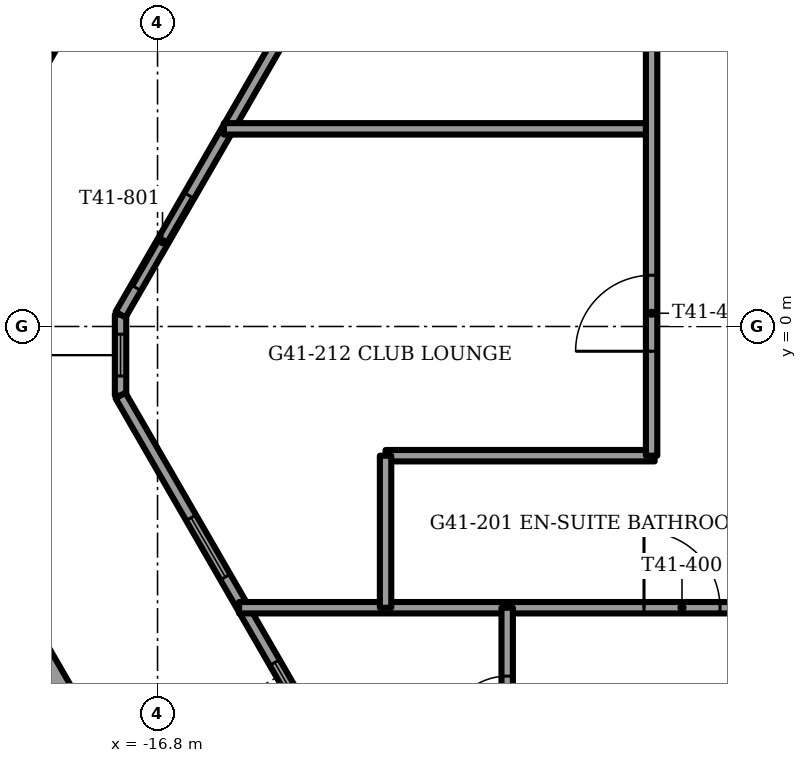
"""IFC4 building model, lengths in metres.
Left out: names, types, materials, properties, quantities, classifications, styles, units other than length and angle.
Written with IfcOpenShell. Run it as: python <this file> out.ifc"""

import sys

from ifc_helpers import new_model, si_unit, direction, frame, frame_2d, origin, place, context, subcontext, project, spatial, rectangle, extrude, element, fill, save


model = new_model("IFC4")
c1 = context("Model", 3, precision=1e-05, world=origin(), true_north=direction((0.0, 1.0)))
c2 = subcontext(c1, "Body", "Model", "MODEL_VIEW")
j1 = project(units=[si_unit("LENGTHUNIT", "METRE"), si_unit("PLANEANGLEUNIT", "RADIAN")], contexts=[c1])
p1 = place(None, origin())
s1 = spatial("IfcSite", under=j1, at=p1, CompositionType="ELEMENT")
p2 = place(p1, origin())
s2 = spatial("IfcBuilding", under=s1, at=p2, CompositionType="ELEMENT")
p3 = place(p2, frame((0.0, 0.0, 168.25)))
s3 = spatial("IfcBuildingStorey", under=s2, at=p3, CompositionType="ELEMENT", Elevation=168.25)
p4 = place(p3, frame((-17.61, 5.446, 0.0), z_axis=(0.0, 0.0, 1.0), x_axis=(-0.500000533151, -0.866025095969, 0.0)))
e1 = element("IfcWall", 1, at=p4, inside=s3, PredefinedType="PARAPET", context=c2, shape_type="SweptSolid", body=[
    extrude(rectangle(XDim=6.181, YDim=0.9, at=frame_2d((3.091, 0.0))), origin(), (0.0, 0.0, 1.0), 1.1),
])
p5 = place(p3, frame((-20.7, -0.846, 0.0), z_axis=(0.0, 0.0, 1.0), x_axis=(0.500014212531, -0.86601719802, 0.0)))
e2 = element("IfcWall", 2, at=p5, inside=s3, PredefinedType="PARAPET", context=c2, shape_type="SweptSolid", body=[
    extrude(rectangle(XDim=5.529, YDim=0.9, at=frame_2d((2.765, 0.0))), origin(), (0.0, 0.0, 1.0), 1.1),
])
p6 = place(p3, frame((-7.393, 17.292, 0.0), z_axis=(0.0, 0.0, 1.0), x_axis=(-0.500001917853, -0.866024296509, 0.0)))
e3 = element("IfcWall", 3, at=p6, inside=s3, PredefinedType="SOLIDWALL", context=c2, shape_type="SweptSolid", body=[
    extrude(rectangle(XDim=19.788, YDim=0.15, at=frame_2d((9.894, 0.0))), origin(), (0.0, 0.0, 1.0), 3.45),
])
p7 = place(p6, frame((3.868, 0.0, 0.15)))
e4 = element("IfcOpeningElement", 4, at=p7, cuts=e3, PredefinedType="OPENING", context=c2, shape_type="SweptSolid", body=[
    extrude(rectangle(XDim=1.4, YDim=2.85, at=frame_2d((0.7, 1.425))), frame((0.0, 0.075, 0.0), z_axis=(0.0, -1.0, 0.0), x_axis=(1.0, 0.0, 0.0)), (0.0, 0.0, 1.0), 0.15),
])
p8 = place(p6, frame((10.067, 0.0, 0.15)))
e5 = element("IfcOpeningElement", 5, at=p8, cuts=e3, PredefinedType="OPENING", context=c2, shape_type="SweptSolid", body=[
    extrude(rectangle(XDim=0.9, YDim=2.85, at=frame_2d((0.45, 1.425))), frame((0.0, 0.075, 0.0), z_axis=(0.0, -1.0, 0.0), x_axis=(1.0, 0.0, 0.0)), (0.0, 0.0, 1.0), 0.15),
])
p9 = place(p6, frame((7.967, 0.0, 0.15)))
e6 = element("IfcOpeningElement", 6, at=p9, cuts=e3, PredefinedType="OPENING", context=c2, shape_type="SweptSolid", body=[
    extrude(rectangle(XDim=1.4, YDim=2.85, at=frame_2d((0.7, 1.425))), frame((0.0, 0.075, 0.0), z_axis=(0.0, -1.0, 0.0), x_axis=(1.0, 0.0, 0.0)), (0.0, 0.0, 1.0), 0.15),
])
p10 = place(p6, frame((13.779, 0.0, 0.0)))
e7 = element("IfcOpeningElement", 7, at=p10, cuts=e3, PredefinedType="OPENING", context=c2, shape_type="SweptSolid", body=[
    extrude(rectangle(XDim=1.4, YDim=2.4, at=frame_2d((0.7, 1.2))), frame((0.0, 0.075, 0.0), z_axis=(0.0, -1.0, 0.0), x_axis=(1.0, 0.0, 0.0)), (0.0, 0.0, 1.0), 0.15),
])
p11 = place(p6, frame((17.979, 0.0, 0.0)))
e8 = element("IfcOpeningElement", 8, at=p11, cuts=e3, PredefinedType="OPENING", context=c2, shape_type="SweptSolid", body=[
    extrude(rectangle(XDim=1.4, YDim=2.4, at=frame_2d((0.7, 1.2))), frame((0.0, 0.075, 0.0), z_axis=(0.0, -1.0, 0.0), x_axis=(1.0, 0.0, 0.0)), (0.0, 0.0, 1.0), 0.15),
])
p12 = place(p6, frame((0.168, 0.0, 0.15)))
e9 = element("IfcOpeningElement", 9, at=p12, cuts=e3, PredefinedType="OPENING", context=c2, shape_type="SweptSolid", body=[
    extrude(rectangle(XDim=1.6, YDim=2.73, at=frame_2d((0.8, 1.365))), frame((0.0, 0.075, 0.0), z_axis=(0.0, -1.0, 0.0), x_axis=(1.0, 0.0, 0.0)), (0.0, 0.0, 1.0), 0.15),
])
p13 = place(p3, frame((-17.287, -0.909, 0.0), z_axis=(0.0, 0.0, 1.0), x_axis=(0.500004460396, -0.866022828558, 0.0)))
e10 = element("IfcWall", 10, at=p13, inside=s3, PredefinedType="SOLIDWALL", context=c2, shape_type="SweptSolid", body=[
    extrude(rectangle(XDim=15.712, YDim=0.15, at=frame_2d((7.856, 0.0))), origin(), (0.0, 0.0, 1.0), 3.45),
])
p14 = place(p13, frame((1.856, 0.0, 0.15)))
e11 = element("IfcOpeningElement", 11, at=p14, cuts=e10, PredefinedType="OPENING", context=c2, shape_type="SweptSolid", body=[
    extrude(rectangle(XDim=0.9, YDim=2.85, at=frame_2d((0.45, 1.425))), frame((0.0, 0.075, 0.0), z_axis=(0.0, -1.0, 0.0), x_axis=(1.0, 0.0, 0.0)), (0.0, 0.0, 1.0), 0.15),
])
p15 = place(p13, frame((4.056, 0.0, 0.15)))
e12 = element("IfcOpeningElement", 12, at=p15, cuts=e10, PredefinedType="OPENING", context=c2, shape_type="SweptSolid", body=[
    extrude(rectangle(XDim=1.4, YDim=2.85, at=frame_2d((0.7, 1.425))), frame((0.0, 0.075, 0.0), z_axis=(0.0, -1.0, 0.0), x_axis=(1.0, 0.0, 0.0)), (0.0, 0.0, 1.0), 0.15),
])
p16 = place(p13, frame((6.549, 0.0, 0.15)))
e13 = element("IfcOpeningElement", 13, at=p16, cuts=e10, PredefinedType="OPENING", context=c2, shape_type="SweptSolid", body=[
    extrude(rectangle(XDim=1.6, YDim=2.85, at=frame_2d((0.8, 1.425))), frame((0.0, 0.075, 0.0), z_axis=(0.0, -1.0, 0.0), x_axis=(1.0, 0.0, 0.0)), (0.0, 0.0, 1.0), 0.15),
])
p17 = place(p13, frame((8.256, 0.0, 0.0)))
e14 = element("IfcOpeningElement", 14, at=p17, cuts=e10, PredefinedType="OPENING", context=c2, shape_type="SweptSolid", body=[
    extrude(rectangle(XDim=1.4, YDim=2.4, at=frame_2d((0.7, 1.2))), frame((0.0, 0.075, 0.0), z_axis=(0.0, -1.0, 0.0), x_axis=(1.0, 0.0, 0.0)), (0.0, 0.0, 1.0), 0.15),
])
p18 = place(p13, frame((10.256, 0.0, 0.15)))
e15 = element("IfcOpeningElement", 15, at=p18, cuts=e10, PredefinedType="OPENING", context=c2, shape_type="SweptSolid", body=[
    extrude(rectangle(XDim=0.9, YDim=2.85, at=frame_2d((0.45, 1.425))), frame((0.0, 0.075, 0.0), z_axis=(0.0, -1.0, 0.0), x_axis=(1.0, 0.0, 0.0)), (0.0, 0.0, 1.0), 0.15),
])
p19 = place(p3, frame((-17.287, 0.156, 0.0), z_axis=(0.0, 0.0, 1.0), x_axis=(0.0, -1.0, 0.0)))
e16 = element("IfcWall", 16, at=p19, inside=s3, PredefinedType="SOLIDWALL", context=c2, shape_type="SweptSolid", body=[
    extrude(rectangle(XDim=1.065, YDim=0.15, at=frame_2d((0.532, 0.0))), origin(), (0.0, 0.0, 1.0), 3.45),
])
p20 = place(p19, frame((0.258, 0.0, 0.15)))
e17 = element("IfcOpeningElement", 17, at=p20, cuts=e16, PredefinedType="OPENING", context=c2, shape_type="SweptSolid", body=[
    extrude(rectangle(XDim=0.55, YDim=2.85, at=frame_2d((0.275, 1.425))), frame((0.0, 0.075, 0.0), z_axis=(0.0, -1.0, 0.0), x_axis=(1.0, 0.0, 0.0)), (0.0, 0.0, 1.0), 0.15),
])
p21 = place(p3, frame((-15.727, -3.7, 0.0), z_axis=(0.0, 0.0, 1.0), x_axis=(1.0, 0.0, 0.0)))
e18 = element("IfcWall", 18, at=p21, inside=s3, PredefinedType="PARTITIONING", context=c2, shape_type="SweptSolid", body=[
    extrude(rectangle(XDim=6.567, YDim=0.15, at=frame_2d((3.284, 0.0))), origin(), (0.0, 0.0, 1.0), 3.45),
])
p22 = place(p21, frame((5.327, 0.0, 0.0)))
e19 = element("IfcOpeningElement", 19, at=p22, cuts=e18, PredefinedType="OPENING", context=c2, shape_type="SweptSolid", body=[
    extrude(rectangle(XDim=1.0, YDim=2.1, at=frame_2d((0.5, 1.05))), frame((0.0, 0.075, 0.0), z_axis=(0.0, -1.0, 0.0), x_axis=(1.0, 0.0, 0.0)), (0.0, 0.0, 1.0), 0.15),
])
p23 = place(p3, frame((-13.8, -1.7, 0.0), z_axis=(0.0, 0.0, 1.0), x_axis=(1.0, 0.0, 0.0)))
e20 = element("IfcWall", 20, at=p23, inside=s3, PredefinedType="PARTITIONING", context=c2, shape_type="SweptSolid", body=[
    extrude(rectangle(XDim=3.54, YDim=0.15, at=frame_2d((1.77, 0.0))), origin(), (0.0, 0.0, 1.0), 3.45),
])
p24 = place(p3, frame((-15.927, 2.6, 0.0), z_axis=(0.0, 0.0, 1.0), x_axis=(1.0, 0.0, 0.0)))
e21 = element("IfcWall", 21, at=p24, inside=s3, PredefinedType="PARTITIONING", context=c2, shape_type="SweptSolid", body=[
    extrude(rectangle(XDim=5.627, YDim=0.15, at=frame_2d((2.813, 0.0))), origin(), (0.0, 0.0, 1.0), 3.45),
])
p25 = place(p3, frame((-10.3, -1.7, 0.0), z_axis=(0.0, 0.0, 1.0), x_axis=(0.0, 1.0, 0.0)))
e22 = element("IfcWall", 22, at=p25, inside=s3, PredefinedType="PARTITIONING", context=c2, shape_type="SweptSolid", body=[
    extrude(rectangle(XDim=14.047, YDim=0.15, at=frame_2d((7.023, 0.0))), origin(), (0.0, 0.0, 1.0), 3.45),
])
p26 = place(p25, frame((1.374, 0.0, 0.0)))
e23 = element("IfcOpeningElement", 23, at=p26, cuts=e22, PredefinedType="OPENING", context=c2, shape_type="SweptSolid", body=[
    extrude(rectangle(XDim=1.0, YDim=2.1, at=frame_2d((0.5, 1.05))), frame((0.0, 0.075, 0.0), z_axis=(0.0, -1.0, 0.0), x_axis=(1.0, 0.0, 0.0)), (0.0, 0.0, 1.0), 0.15),
])
p27 = place(p25, frame((6.005, 0.0, 0.0)))
e24 = element("IfcOpeningElement", 24, at=p27, cuts=e22, PredefinedType="OPENING", context=c2, shape_type="SweptSolid", body=[
    extrude(rectangle(XDim=1.0, YDim=2.1, at=frame_2d((0.5, 1.05))), frame((0.0, 0.075, 0.0), z_axis=(0.0, -1.0, 0.0), x_axis=(1.0, 0.0, 0.0)), (0.0, 0.0, 1.0), 0.15),
])
p28 = place(p25, frame((11.702, 0.0, 0.0)))
e25 = element("IfcOpeningElement", 25, at=p28, cuts=e22, PredefinedType="OPENING", context=c2, shape_type="SweptSolid", body=[
    extrude(rectangle(XDim=1.0, YDim=2.1, at=frame_2d((0.5, 1.05))), frame((0.0, 0.075, 0.0), z_axis=(0.0, -1.0, 0.0), x_axis=(1.0, 0.0, 0.0)), (0.0, 0.0, 1.0), 0.15),
])
p29 = place(p3, frame((-12.2, -6.3, 0.0), z_axis=(0.0, 0.0, 1.0), x_axis=(0.0, 1.0, 0.0)))
e26 = element("IfcWall", 26, at=p29, inside=s3, PredefinedType="PARTITIONING", context=c2, shape_type="SweptSolid", body=[
    extrude(rectangle(XDim=2.6, YDim=0.15, at=frame_2d((1.3, 0.0))), origin(), (0.0, 0.0, 1.0), 3.45),
])
p30 = place(p29, frame((0.9, 0.0, 0.0)))
e27 = element("IfcOpeningElement", 27, at=p30, cuts=e26, PredefinedType="OPENING", context=c2, shape_type="SweptSolid", body=[
    extrude(rectangle(XDim=0.8, YDim=2.1, at=frame_2d((0.4, 1.05))), frame((0.0, 0.075, 0.0), z_axis=(0.0, -1.0, 0.0), x_axis=(1.0, 0.0, 0.0)), (0.0, 0.0, 1.0), 0.15),
])
p31 = place(p3, frame((-13.8, -3.7, 0.0), z_axis=(0.0, 0.0, 1.0), x_axis=(0.0, 1.0, 0.0)))
e28 = element("IfcWall", 28, at=p31, inside=s3, PredefinedType="PARTITIONING", context=c2, shape_type="SweptSolid", body=[
    extrude(rectangle(XDim=2.0, YDim=0.15, at=frame_2d((1.0, 0.0))), origin(), (0.0, 0.0, 1.0), 3.45),
])
p32 = place(p11, origin())
e29 = element("IfcDoor", 29, at=p32, inside=s3, OperationType="SLIDING_TO_RIGHT", PredefinedType="DOOR", context=c2, shape_type="SweptSolid", body=[
    extrude(rectangle(XDim=1.4, YDim=2.4, at=frame_2d((0.7, 1.2))), frame((0.0, 0.025, 0.0), z_axis=(0.0, -1.0, 0.0), x_axis=(1.0, 0.0, 0.0)), (0.0, 0.0, 1.0), 0.05),
])
fill(e8, e29)
p33 = place(p14, origin())
e30 = element("IfcWindow", 30, at=p33, inside=s3, PartitioningType="SINGLE_PANEL", PredefinedType="WINDOW", context=c2, shape_type="SweptSolid", body=[
    extrude(rectangle(XDim=0.9, YDim=2.85, at=frame_2d((0.45, 1.425))), frame((0.0, 0.03, 0.0), z_axis=(0.0, -1.0, 0.0), x_axis=(1.0, 0.0, 0.0)), (0.0, 0.0, 1.0), 0.06),
])
fill(e11, e30)
p34 = place(p15, origin())
e31 = element("IfcWindow", 31, at=p34, inside=s3, PartitioningType="SINGLE_PANEL", PredefinedType="WINDOW", context=c2, shape_type="SweptSolid", body=[
    extrude(rectangle(XDim=1.4, YDim=2.85, at=frame_2d((0.7, 1.425))), frame((0.0, 0.03, 0.0), z_axis=(0.0, -1.0, 0.0), x_axis=(1.0, 0.0, 0.0)), (0.0, 0.0, 1.0), 0.06),
])
fill(e12, e31)
p35 = place(p20, origin())
e32 = element("IfcWindow", 32, at=p35, inside=s3, PartitioningType="SINGLE_PANEL", PredefinedType="WINDOW", context=c2, shape_type="SweptSolid", body=[
    extrude(rectangle(XDim=0.55, YDim=2.85, at=frame_2d((0.275, 1.425))), frame((0.0, 0.03, 0.0), z_axis=(0.0, -1.0, 0.0), x_axis=(1.0, 0.0, 0.0)), (0.0, 0.0, 1.0), 0.06),
])
fill(e17, e32)
p36 = place(p22, origin())
e33 = element("IfcDoor", 33, at=p36, inside=s3, OperationType="SINGLE_SWING_RIGHT", PredefinedType="DOOR", context=c2, shape_type="SweptSolid", body=[
    extrude(rectangle(XDim=1.0, YDim=2.1, at=frame_2d((0.5, 1.05))), frame((0.0, 0.025, 0.0), z_axis=(0.0, -1.0, 0.0), x_axis=(1.0, 0.0, 0.0)), (0.0, 0.0, 1.0), 0.05),
])
fill(e19, e33)
p37 = place(p30, origin())
e34 = element("IfcDoor", 34, at=p37, inside=s3, OperationType="SINGLE_SWING_RIGHT", PredefinedType="DOOR", context=c2, shape_type="SweptSolid", body=[
    extrude(rectangle(XDim=0.8, YDim=2.1, at=frame_2d((0.4, 1.05))), frame((0.0, 0.025, 0.0), z_axis=(0.0, -1.0, 0.0), x_axis=(1.0, 0.0, 0.0)), (0.0, 0.0, 1.0), 0.05),
])
fill(e27, e34)
p38 = place(p26, origin())
e35 = element("IfcDoor", 35, at=p38, inside=s3, OperationType="SINGLE_SWING_LEFT", PredefinedType="DOOR", context=c2, shape_type="SweptSolid", body=[
    extrude(rectangle(XDim=1.0, YDim=2.1, at=frame_2d((0.5, 1.05))), frame((0.0, 0.025, 0.0), z_axis=(0.0, -1.0, 0.0), x_axis=(1.0, 0.0, 0.0)), (0.0, 0.0, 1.0), 0.05),
])
fill(e23, e35)
save(model, sys.argv[1])
